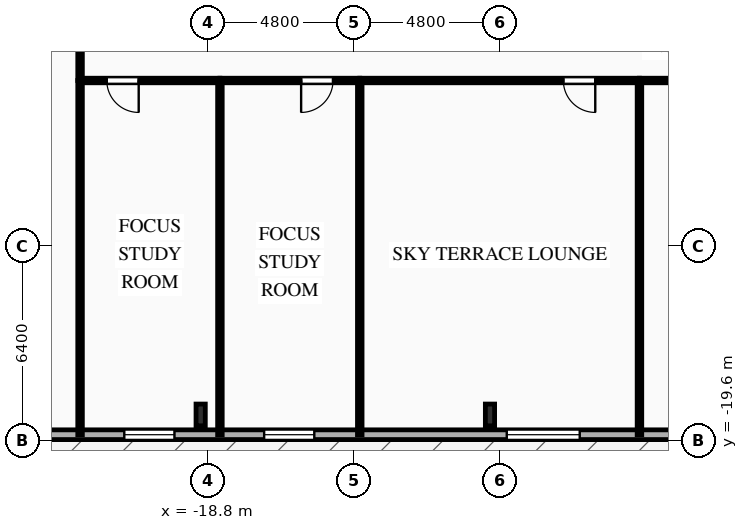
"""IFC4 building model, lengths in metres.
Left out: names, types, materials, properties, quantities, classifications, styles, units other than length and angle.
Written with IfcOpenShell. Run it as: python <this file> out.ifc"""

import sys

from ifc_helpers import new_model, si_unit, direction, frame, frame_2d, origin, origin_2d, place, context, subcontext, project, spatial, rectangle, i_section, extrude, element, fill, save


model = new_model("IFC4")
c1 = context("Model", 3, precision=1e-05, world=origin(), true_north=direction((0.0, 1.0)))
c2 = subcontext(c1, "Body", "Model", "MODEL_VIEW")
j1 = project(units=[si_unit("LENGTHUNIT", "METRE"), si_unit("PLANEANGLEUNIT", "RADIAN")], contexts=[c1])
p1 = place(None, origin())
s1 = spatial("IfcSite", under=j1, at=p1, CompositionType="ELEMENT")
p2 = place(p1, origin())
s2 = spatial("IfcBuilding", under=s1, at=p2, CompositionType="ELEMENT")
p3 = place(p2, frame((0.0, 0.0, 27.0)))
s3 = spatial("IfcBuildingStorey", under=s2, at=p3, CompositionType="ELEMENT", Elevation=27.0)
for number, where, z_axis, x_axis in (
    (1, (-19.033, -18.75, 0.0), (0.0, 0.0, 1.0), (1.0, 0.0, 0.0)),
    (2, (-9.517, -18.75, 0.0), (0.0, 0.0, 1.0), (1.0, 0.0, 0.0)),
):
    element("IfcColumn", number, at=place(p3, frame(where, z_axis=z_axis, x_axis=x_axis)), inside=s3, PredefinedType="COLUMN", context=c2, shape_type="SweptSolid", body=[
        extrude(i_section(OverallWidth=0.304, OverallDepth=0.716, WebThickness=0.021, FlangeThickness=0.04, FilletRadius=0.027, at=origin_2d()), origin(), (0.0, 0.0, 1.0), 3.35),
    ])
p4 = place(p3, frame((29.2, -19.4, 0.0), z_axis=(0.0, 0.0, 1.0), x_axis=(-1.0, 0.0, 0.0)))
e3 = element("IfcWall", 3, at=p4, inside=s3, PredefinedType="SOLIDWALL", context=c2, shape_type="SweptSolid", body=[
    extrude(rectangle(XDim=58.4, YDim=0.32, at=frame_2d((29.2, 0.0))), origin(), (0.0, 0.0, 1.0), 3.035),
])
p5 = place(p4, frame((6.0, 0.0, 0.0)))
e4 = element("IfcOpeningElement", 4, at=p5, cuts=e3, PredefinedType="OPENING", context=c2, shape_type="SweptSolid", body=[
    extrude(rectangle(XDim=1.5, YDim=2.2, at=frame_2d((0.75, 1.1))), frame((0.0, 0.17, 0.0), z_axis=(0.0, -1.0, 0.0), x_axis=(1.0, 0.0, 0.0)), (0.0, 0.0, 1.0), 0.34),
])
p6 = place(p4, frame((8.198, 0.0, 0.85)))
e5 = element("IfcOpeningElement", 5, at=p6, cuts=e3, PredefinedType="OPENING", context=c2, shape_type="SweptSolid", body=[
    extrude(rectangle(XDim=1.65, YDim=1.85, at=frame_2d((0.825, 0.925))), frame((0.0, 0.17, 0.0), z_axis=(0.0, -1.0, 0.0), x_axis=(1.0, 0.0, 0.0)), (0.0, 0.0, 1.0), 0.34),
])
p7 = place(p4, frame((12.335, 0.0, 0.85)))
e6 = element("IfcOpeningElement", 6, at=p7, cuts=e3, PredefinedType="OPENING", context=c2, shape_type="SweptSolid", body=[
    extrude(rectangle(XDim=1.65, YDim=1.85, at=frame_2d((0.825, 0.925))), frame((0.0, 0.17, 0.0), z_axis=(0.0, -1.0, 0.0), x_axis=(1.0, 0.0, 0.0)), (0.0, 0.0, 1.0), 0.34),
])
p8 = place(p4, frame((19.924, 0.0, 0.85)))
e7 = element("IfcOpeningElement", 7, at=p8, cuts=e3, PredefinedType="OPENING", context=c2, shape_type="SweptSolid", body=[
    extrude(rectangle(XDim=2.2, YDim=1.85, at=frame_2d((1.1, 0.925))), frame((0.0, 0.17, 0.0), z_axis=(0.0, -1.0, 0.0), x_axis=(1.0, 0.0, 0.0)), (0.0, 0.0, 1.0), 0.34),
])
p9 = place(p4, frame((26.565, 0.0, 0.85)))
e8 = element("IfcOpeningElement", 8, at=p9, cuts=e3, PredefinedType="OPENING", context=c2, shape_type="SweptSolid", body=[
    extrude(rectangle(XDim=2.4, YDim=1.95, at=frame_2d((1.2, 0.975))), frame((0.0, 0.17, 0.0), z_axis=(0.0, -1.0, 0.0), x_axis=(1.0, 0.0, 0.0)), (0.0, 0.0, 1.0), 0.34),
])
p10 = place(p4, frame((35.765, 0.0, 0.85)))
e9 = element("IfcOpeningElement", 9, at=p10, cuts=e3, PredefinedType="OPENING", context=c2, shape_type="SweptSolid", body=[
    extrude(rectangle(XDim=2.4, YDim=1.95, at=frame_2d((1.2, 0.975))), frame((0.0, 0.17, 0.0), z_axis=(0.0, -1.0, 0.0), x_axis=(1.0, 0.0, 0.0)), (0.0, 0.0, 1.0), 0.34),
])
p11 = place(p4, frame((44.495, 0.0, 0.85)))
e10 = element("IfcOpeningElement", 10, at=p11, cuts=e3, PredefinedType="OPENING", context=c2, shape_type="SweptSolid", body=[
    extrude(rectangle(XDim=1.65, YDim=1.85, at=frame_2d((0.825, 0.925))), frame((0.0, 0.17, 0.0), z_axis=(0.0, -1.0, 0.0), x_axis=(1.0, 0.0, 0.0)), (0.0, 0.0, 1.0), 0.34),
])
p12 = place(p4, frame((49.095, 0.0, 0.85)))
e11 = element("IfcOpeningElement", 11, at=p12, cuts=e3, PredefinedType="OPENING", context=c2, shape_type="SweptSolid", body=[
    extrude(rectangle(XDim=1.65, YDim=1.85, at=frame_2d((0.825, 0.925))), frame((0.0, 0.17, 0.0), z_axis=(0.0, -1.0, 0.0), x_axis=(1.0, 0.0, 0.0)), (0.0, 0.0, 1.0), 0.34),
])
p13 = place(p4, frame((53.92, 0.0, 0.85)))
e12 = element("IfcOpeningElement", 12, at=p13, cuts=e3, PredefinedType="OPENING", context=c2, shape_type="SweptSolid", body=[
    extrude(rectangle(XDim=2.4, YDim=1.95, at=frame_2d((1.2, 0.975))), frame((0.0, 0.17, 0.0), z_axis=(0.0, -1.0, 0.0), x_axis=(1.0, 0.0, 0.0)), (0.0, 0.0, 1.0), 0.34),
])
p14 = place(p3, frame((-23.0, -7.75, 0.0), z_axis=(0.0, 0.0, 1.0), x_axis=(0.0, 1.0, 0.0)))
e13 = element("IfcWall", 13, at=p14, inside=s3, PredefinedType="PARTITIONING", context=c2, shape_type="SweptSolid", body=[
    extrude(rectangle(XDim=2.15, YDim=0.15, at=frame_2d((1.075, 0.0))), origin(), (0.0, 0.0, 1.0), 3.035),
])
p15 = place(p3, frame((-18.4, -7.75, 0.0), z_axis=(0.0, 0.0, 1.0), x_axis=(-1.0, 0.0, 0.0)))
e14 = element("IfcWall", 14, at=p15, inside=s3, PredefinedType="PARTITIONING", context=c2, shape_type="SweptSolid", body=[
    extrude(rectangle(XDim=4.6, YDim=0.15, at=frame_2d((2.3, 0.0))), origin(), (0.0, 0.0, 1.0), 3.035),
])
p16 = place(p15, frame((2.671, 0.0, 0.0)))
e15 = element("IfcOpeningElement", 15, at=p16, cuts=e14, PredefinedType="OPENING", context=c2, shape_type="SweptSolid", body=[
    extrude(rectangle(XDim=1.05, YDim=2.15, at=frame_2d((0.525, 1.075))), frame((0.0, 0.085, 0.0), z_axis=(0.0, -1.0, 0.0), x_axis=(1.0, 0.0, 0.0)), (0.0, 0.0, 1.0), 0.17),
])
p17 = place(p3, frame((-13.8, -7.75, 0.0), z_axis=(0.0, 0.0, 1.0), x_axis=(-1.0, 0.0, 0.0)))
e16 = element("IfcWall", 16, at=p17, inside=s3, PredefinedType="PARTITIONING", context=c2, shape_type="SweptSolid", body=[
    extrude(rectangle(XDim=4.6, YDim=0.15, at=frame_2d((2.3, 0.0))), origin(), (0.0, 0.0, 1.0), 3.035),
])
p18 = place(p17, frame((0.879, 0.0, 0.0)))
e17 = element("IfcOpeningElement", 17, at=p18, cuts=e16, PredefinedType="OPENING", context=c2, shape_type="SweptSolid", body=[
    extrude(rectangle(XDim=1.05, YDim=2.15, at=frame_2d((0.525, 1.075))), frame((0.0, 0.085, 0.0), z_axis=(0.0, -1.0, 0.0), x_axis=(1.0, 0.0, 0.0)), (0.0, 0.0, 1.0), 0.17),
])
p19 = place(p3, frame((-4.6, -7.75, 0.0), z_axis=(0.0, 0.0, 1.0), x_axis=(-1.0, 0.0, 0.0)))
e18 = element("IfcWall", 18, at=p19, inside=s3, PredefinedType="PARTITIONING", context=c2, shape_type="SweptSolid", body=[
    extrude(rectangle(XDim=9.2, YDim=0.15, at=frame_2d((4.6, 0.0))), origin(), (0.0, 0.0, 1.0), 3.035),
])
p20 = place(p19, frame((1.454, 0.0, 0.0)))
e19 = element("IfcOpeningElement", 19, at=p20, cuts=e18, PredefinedType="OPENING", context=c2, shape_type="SweptSolid", body=[
    extrude(rectangle(XDim=1.05, YDim=2.15, at=frame_2d((0.525, 1.075))), frame((0.0, 0.085, 0.0), z_axis=(0.0, -1.0, 0.0), x_axis=(1.0, 0.0, 0.0)), (0.0, 0.0, 1.0), 0.17),
])
p21 = place(p3, frame((0.0, -7.75, 0.0), z_axis=(0.0, 0.0, 1.0), x_axis=(-1.0, 0.0, 0.0)))
e20 = element("IfcWall", 20, at=p21, inside=s3, PredefinedType="PARTITIONING", context=c2, shape_type="SweptSolid", body=[
    extrude(rectangle(XDim=4.6, YDim=0.15, at=frame_2d((2.3, 0.0))), origin(), (0.0, 0.0, 1.0), 3.035),
])
p22 = place(p21, frame((0.879, 0.0, 0.0)))
e21 = element("IfcOpeningElement", 21, at=p22, cuts=e20, PredefinedType="OPENING", context=c2, shape_type="SweptSolid", body=[
    extrude(rectangle(XDim=1.05, YDim=2.15, at=frame_2d((0.525, 1.075))), frame((0.0, 0.085, 0.0), z_axis=(0.0, -1.0, 0.0), x_axis=(1.0, 0.0, 0.0)), (0.0, 0.0, 1.0), 0.17),
])
for number, where, z_axis, x_axis in (
    (22, (-23.0, -7.75, 0.0), (0.0, 0.0, 1.0), (0.0, -1.0, 0.0)),
    (23, (-18.4, -7.75, 0.0), (0.0, 0.0, 1.0), (0.0, -1.0, 0.0)),
    (24, (-13.8, -7.75, 0.0), (0.0, 0.0, 1.0), (0.0, -1.0, 0.0)),
    (25, (-4.6, -7.75, 0.0), (0.0, 0.0, 1.0), (0.0, -1.0, 0.0)),
):
    element("IfcWall", number, at=place(p3, frame(where, z_axis=z_axis, x_axis=x_axis)), inside=s3, PredefinedType="PARTITIONING", context=c2, shape_type="SweptSolid", body=[
        extrude(rectangle(XDim=11.65, YDim=0.15, at=frame_2d((5.825, 0.0))), origin(), (0.0, 0.0, 1.0), 3.035),
    ])
p23 = place(p10, origin())
e26 = element("IfcWindow", 26, at=p23, inside=s3, PartitioningType="SINGLE_PANEL", PredefinedType="WINDOW", context=c2, shape_type="SweptSolid", body=[
    extrude(rectangle(XDim=2.4, YDim=1.95, at=frame_2d((1.2, 0.975))), frame((0.0, 0.03, 0.0), z_axis=(0.0, -1.0, 0.0), x_axis=(1.0, 0.0, 0.0)), (0.0, 0.0, 1.0), 0.06),
])
fill(e9, e26)
p24 = place(p11, origin())
e27 = element("IfcWindow", 27, at=p24, inside=s3, PartitioningType="SINGLE_PANEL", PredefinedType="WINDOW", context=c2, shape_type="SweptSolid", body=[
    extrude(rectangle(XDim=1.65, YDim=1.85, at=frame_2d((0.825, 0.925))), frame((0.0, 0.03, 0.0), z_axis=(0.0, -1.0, 0.0), x_axis=(1.0, 0.0, 0.0)), (0.0, 0.0, 1.0), 0.06),
])
fill(e10, e27)
p25 = place(p12, origin())
e28 = element("IfcWindow", 28, at=p25, inside=s3, PartitioningType="SINGLE_PANEL", PredefinedType="WINDOW", context=c2, shape_type="SweptSolid", body=[
    extrude(rectangle(XDim=1.65, YDim=1.85, at=frame_2d((0.825, 0.925))), frame((0.0, 0.03, 0.0), z_axis=(0.0, -1.0, 0.0), x_axis=(1.0, 0.0, 0.0)), (0.0, 0.0, 1.0), 0.06),
])
fill(e11, e28)
p26 = place(p16, origin())
e29 = element("IfcDoor", 29, at=p26, inside=s3, OperationType="SINGLE_SWING_LEFT", PredefinedType="DOOR", context=c2, shape_type="SweptSolid", body=[
    extrude(rectangle(XDim=1.05, YDim=2.15, at=frame_2d((0.525, 1.075))), frame((0.0, 0.025, 0.0), z_axis=(0.0, -1.0, 0.0), x_axis=(1.0, 0.0, 0.0)), (0.0, 0.0, 1.0), 0.05),
])
fill(e15, e29)
p27 = place(p18, origin())
e30 = element("IfcDoor", 30, at=p27, inside=s3, OperationType="SINGLE_SWING_RIGHT", PredefinedType="DOOR", context=c2, shape_type="SweptSolid", body=[
    extrude(rectangle(XDim=1.05, YDim=2.15, at=frame_2d((0.525, 1.075))), frame((0.0, 0.025, 0.0), z_axis=(0.0, -1.0, 0.0), x_axis=(1.0, 0.0, 0.0)), (0.0, 0.0, 1.0), 0.05),
])
fill(e17, e30)
p28 = place(p20, origin())
e31 = element("IfcDoor", 31, at=p28, inside=s3, OperationType="SINGLE_SWING_LEFT", PredefinedType="DOOR", context=c2, shape_type="SweptSolid", body=[
    extrude(rectangle(XDim=1.05, YDim=2.15, at=frame_2d((0.525, 1.075))), frame((0.0, 0.025, 0.0), z_axis=(0.0, -1.0, 0.0), x_axis=(1.0, 0.0, 0.0)), (0.0, 0.0, 1.0), 0.05),
])
fill(e19, e31)
save(model, sys.argv[1])
